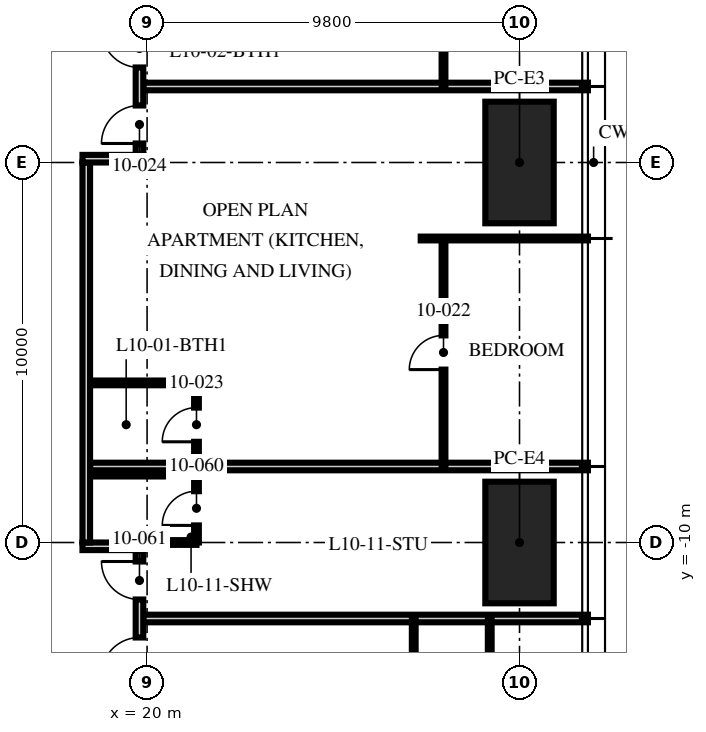
"""IFC4 building model, lengths in metres.
Left out: names, types, materials, properties, quantities, classifications, styles, units other than length and angle.
Written with IfcOpenShell. Run it as: python <this file> out.ifc"""

import sys

from ifc_helpers import new_model, si_unit, direction, frame, frame_2d, origin, origin_2d, place, context, subcontext, project, spatial, rectangle, hollow_rectangle, extrude, element, fill, save


model = new_model("IFC4")
c1 = context("Model", 3, precision=1e-05, world=origin(), true_north=direction((0.0, 1.0)))
c2 = subcontext(c1, "Body", "Model", "MODEL_VIEW")
j1 = project(units=[si_unit("LENGTHUNIT", "METRE"), si_unit("PLANEANGLEUNIT", "RADIAN")], contexts=[c1])
p1 = place(None, origin())
s1 = spatial("IfcSite", under=j1, at=p1, CompositionType="ELEMENT")
p2 = place(p1, origin())
s2 = spatial("IfcBuilding", under=s1, at=p2, CompositionType="ELEMENT")
p3 = place(p2, frame((0.0, 0.0, 43.5)))
s3 = spatial("IfcBuildingStorey", under=s2, at=p3, CompositionType="ELEMENT", Elevation=43.5)
for number, where, z_axis, x_axis in (
    (1, (29.8, 0.0, 0.0), (0.0, 0.0, 1.0), (0.0, 1.0, 0.0)),
    (2, (29.8, -10.0, 0.0), (0.0, 0.0, 1.0), (0.0, 1.0, 0.0)),
):
    element("IfcColumn", number, at=place(p3, frame(where, z_axis=z_axis, x_axis=x_axis)), inside=s3, PredefinedType="COLUMN", context=c2, shape_type="SweptSolid", body=[
        extrude(hollow_rectangle(XDim=3.2, YDim=1.8, WallThickness=0.2, at=origin_2d()), origin(), (0.0, 0.0, 1.0), 3.75),
    ])
p4 = place(p3, frame((18.5, -8.0, 0.0), z_axis=(0.0, 0.0, 1.0), x_axis=(1.0, 0.0, 0.0)))
e3 = element("IfcWall", 3, at=p4, inside=s3, PredefinedType="PARTITIONING", context=c2, shape_type="SweptSolid", body=[
    extrude(rectangle(XDim=13.1, YDim=0.2, at=frame_2d((6.55, 0.0))), origin(), (0.0, 0.0, 1.0), 2.71),
])
p5 = place(p3, frame((27.2, -2.0, 0.0), z_axis=(0.0, 0.0, 1.0), x_axis=(1.0, 0.0, 0.0)))
e4 = element("IfcWall", 4, at=p5, inside=s3, PredefinedType="PARTITIONING", context=c2, shape_type="SweptSolid", body=[
    extrude(rectangle(XDim=4.4, YDim=0.1, at=frame_2d((2.2, 0.0))), origin(), (0.0, 0.0, 1.0), 2.71),
])
for number, where, z_axis, x_axis in (
    (5, (19.9, 2.0, 0.0), (0.0, 0.0, 1.0), (1.0, 0.0, 0.0)),
    (6, (19.9, -12.0, 0.0), (0.0, 0.0, 1.0), (1.0, 0.0, 0.0)),
):
    element("IfcWall", number, at=place(p3, frame(where, z_axis=z_axis, x_axis=x_axis)), inside=s3, PredefinedType="PARTITIONING", context=c2, shape_type="SweptSolid", body=[
        extrude(rectangle(XDim=11.7, YDim=0.2, at=frame_2d((5.85, 0.0))), origin(), (0.0, 0.0, 1.0), 2.71),
    ])
p6 = place(p3, frame((27.8, -8.0, 0.0), z_axis=(0.0, 0.0, 1.0), x_axis=(0.0, 1.0, 0.0)))
e7 = element("IfcWall", 7, at=p6, inside=s3, PredefinedType="PARTITIONING", context=c2, shape_type="SweptSolid", body=[
    extrude(rectangle(XDim=6.0, YDim=0.1, at=frame_2d((3.0, 0.0))), origin(), (0.0, 0.0, 1.0), 2.61),
])
p7 = place(p6, frame((2.55, 0.0, 0.0)))
e8 = element("IfcOpeningElement", 8, at=p7, cuts=e7, PredefinedType="OPENING", context=c2, shape_type="SweptSolid", body=[
    extrude(rectangle(XDim=0.9, YDim=2.1, at=frame_2d((0.45, 1.05))), frame((0.0, 0.06, 0.0), z_axis=(0.0, -1.0, 0.0), x_axis=(1.0, 0.0, 0.0)), (0.0, 0.0, 1.0), 0.12),
])
p8 = place(p3, frame((21.3, -8.0, 0.0), z_axis=(0.0, 0.0, 1.0), x_axis=(0.0, 1.0, 0.0)))
e9 = element("IfcWall", 9, at=p8, inside=s3, PredefinedType="PARTITIONING", context=c2, shape_type="SweptSolid", body=[
    extrude(rectangle(XDim=2.2, YDim=0.125, at=frame_2d((1.1, 0.0))), origin(), (0.0, 0.0, 1.0), 3.5),
])
p9 = place(p8, frame((0.65, 0.0, 0.0)))
e10 = element("IfcOpeningElement", 10, at=p9, cuts=e9, PredefinedType="OPENING", context=c2, shape_type="SweptSolid", body=[
    extrude(rectangle(XDim=0.9, YDim=2.1, at=frame_2d((0.45, 1.05))), frame((0.0, 0.073, 0.0), z_axis=(0.0, -1.0, 0.0), x_axis=(1.0, 0.0, 0.0)), (0.0, 0.0, 1.0), 0.145),
])
p10 = place(p3, frame((18.5, -5.8, 0.0), z_axis=(0.0, 0.0, 1.0), x_axis=(1.0, 0.0, 0.0)))
e11 = element("IfcWall", 11, at=p10, inside=s3, PredefinedType="PARTITIONING", context=c2, shape_type="SweptSolid", body=[
    extrude(rectangle(XDim=2.8, YDim=0.125, at=frame_2d((1.4, 0.0))), origin(), (0.0, 0.0, 1.0), 3.5),
])
p11 = place(p3, frame((27.8, 2.0, 0.0), z_axis=(0.0, 0.0, 1.0), x_axis=(0.0, 1.0, 0.0)))
e12 = element("IfcWall", 12, at=p11, inside=s3, PredefinedType="PARTITIONING", context=c2, shape_type="SweptSolid", body=[
    extrude(rectangle(XDim=6.0, YDim=0.1, at=frame_2d((3.0, 0.0))), origin(), (0.0, 0.0, 1.0), 2.61),
])
p12 = place(p11, frame((2.55, 0.0, 0.0)))
e13 = element("IfcOpeningElement", 13, at=p12, cuts=e12, PredefinedType="OPENING", context=c2, shape_type="SweptSolid", body=[
    extrude(rectangle(XDim=0.9, YDim=2.1, at=frame_2d((0.45, 1.05))), frame((0.0, 0.06, 0.0), z_axis=(0.0, -1.0, 0.0), x_axis=(1.0, 0.0, 0.0)), (0.0, 0.0, 1.0), 0.12),
])
p13 = place(p3, frame((29.017, -18.0, 0.0), z_axis=(0.0, 0.0, 1.0), x_axis=(0.0, 1.0, 0.0)))
e14 = element("IfcWall", 14, at=p13, inside=s3, PredefinedType="PARTITIONING", context=c2, shape_type="SweptSolid", body=[
    extrude(rectangle(XDim=6.0, YDim=0.1, at=frame_2d((3.0, 0.0))), origin(), (0.0, 0.0, 1.0), 2.61),
])
p14 = place(p13, frame((0.15, 0.0, 0.0)))
e15 = element("IfcOpeningElement", 15, at=p14, cuts=e14, PredefinedType="OPENING", context=c2, shape_type="SweptSolid", body=[
    extrude(rectangle(XDim=0.9, YDim=2.1, at=frame_2d((0.45, 1.05))), frame((0.0, 0.06, 0.0), z_axis=(0.0, -1.0, 0.0), x_axis=(1.0, 0.0, 0.0)), (0.0, 0.0, 1.0), 0.12),
])
p15 = place(p13, frame((3.15, 0.0, 0.0)))
e16 = element("IfcOpeningElement", 16, at=p15, cuts=e14, PredefinedType="OPENING", context=c2, shape_type="SweptSolid", body=[
    extrude(rectangle(XDim=0.9, YDim=2.1, at=frame_2d((0.45, 1.05))), frame((0.0, 0.06, 0.0), z_axis=(0.0, -1.0, 0.0), x_axis=(1.0, 0.0, 0.0)), (0.0, 0.0, 1.0), 0.12),
])
p16 = place(p3, frame((27.017, -16.8, 0.0), z_axis=(0.0, 0.0, 1.0), x_axis=(0.0, 1.0, 0.0)))
e17 = element("IfcWall", 17, at=p16, inside=s3, PredefinedType="PARTITIONING", context=c2, shape_type="SweptSolid", body=[
    extrude(rectangle(XDim=4.8, YDim=0.1, at=frame_2d((2.4, 0.0))), origin(), (0.0, 0.0, 1.0), 2.61),
])
p17 = place(p3, frame((21.3, -10.0, 0.0), z_axis=(0.0, 0.0, 1.0), x_axis=(0.0, 1.0, 0.0)))
e18 = element("IfcWall", 18, at=p17, inside=s3, PredefinedType="PARTITIONING", context=c2, shape_type="SweptSolid", body=[
    extrude(rectangle(XDim=1.8, YDim=0.125, at=frame_2d((0.9, 0.0))), origin(), (0.0, 0.0, 1.0), 2.492),
])
p18 = place(p17, frame((0.45, 0.0, 0.0)))
e19 = element("IfcOpeningElement", 19, at=p18, cuts=e18, PredefinedType="OPENING", context=c2, shape_type="SweptSolid", body=[
    extrude(rectangle(XDim=0.9, YDim=2.1, at=frame_2d((0.45, 1.05))), frame((0.0, 0.073, 0.0), z_axis=(0.0, -1.0, 0.0), x_axis=(1.0, 0.0, 0.0)), (0.0, 0.0, 1.0), 0.145),
])
p19 = place(p3, frame((19.97, -10.0, 0.0), z_axis=(0.0, 0.0, 1.0), x_axis=(1.0, 0.0, 0.0)))
e20 = element("IfcWall", 20, at=p19, inside=s3, PredefinedType="PARTITIONING", context=c2, shape_type="SweptSolid", body=[
    extrude(rectangle(XDim=1.33, YDim=0.125, at=frame_2d((0.665, 0.0))), origin(), (0.0, 0.0, 1.0), 2.492),
])
p20 = place(p3, frame((18.5, -8.2, 0.0), z_axis=(0.0, 0.0, 1.0), x_axis=(1.0, 0.0, 0.0)))
e21 = element("IfcWall", 21, at=p20, inside=s3, PredefinedType="PARTITIONING", context=c2, shape_type="SweptSolid", body=[
    extrude(rectangle(XDim=2.8, YDim=0.125, at=frame_2d((1.4, 0.0))), origin(), (0.0, 0.0, 1.0), 3.5),
])
p21 = place(p3, frame((18.3, -10.1, 0.0), z_axis=(0.0, 0.0, 1.0), x_axis=(1.0, 0.0, 0.0)))
e22 = element("IfcWall", 22, at=p21, inside=s3, PredefinedType="PARTITIONING", context=c2, shape_type="SweptSolid", body=[
    extrude(rectangle(XDim=1.6, YDim=0.2, at=frame_2d((0.8, 0.0))), origin(), (0.0, 0.0, 1.0), 2.492),
])
p22 = place(p3, frame((19.8, -13.8, 0.0), z_axis=(0.0, 0.0, 1.0), x_axis=(0.0, 1.0, 0.0)))
e23 = element("IfcWall", 23, at=p22, inside=s3, PredefinedType="PARTITIONING", context=c2, shape_type="SweptSolid", body=[
    extrude(rectangle(XDim=3.6, YDim=0.2, at=frame_2d((1.8, 0.0))), origin(), (0.0, 0.0, 1.0), 3.5),
])
p23 = place(p22, frame((0.3, 0.0, 0.0)))
e24 = element("IfcOpeningElement", 24, at=p23, cuts=e23, PredefinedType="OPENING", context=c2, shape_type="SweptSolid", body=[
    extrude(rectangle(XDim=1.0, YDim=2.2, at=frame_2d((0.5, 1.1))), frame((0.0, 0.11, 0.0), z_axis=(0.0, -1.0, 0.0), x_axis=(1.0, 0.0, 0.0)), (0.0, 0.0, 1.0), 0.22),
])
p24 = place(p22, frame((2.3, 0.0, 0.0)))
e25 = element("IfcOpeningElement", 25, at=p24, cuts=e23, PredefinedType="OPENING", context=c2, shape_type="SweptSolid", body=[
    extrude(rectangle(XDim=1.0, YDim=2.2, at=frame_2d((0.5, 1.1))), frame((0.0, 0.11, 0.0), z_axis=(0.0, -1.0, 0.0), x_axis=(1.0, 0.0, 0.0)), (0.0, 0.0, 1.0), 0.22),
])
p25 = place(p3, frame((18.4, -10.0, 0.0), z_axis=(0.0, 0.0, 1.0), x_axis=(0.0, 1.0, 0.0)))
e26 = element("IfcWall", 26, at=p25, inside=s3, PredefinedType="PARTITIONING", context=c2, shape_type="SweptSolid", body=[
    extrude(rectangle(XDim=10.0, YDim=0.2, at=frame_2d((5.0, 0.0))), origin(), (0.0, 0.0, 1.0), 2.492),
])
p26 = place(p3, frame((18.3, 0.1, 0.0), z_axis=(0.0, 0.0, 1.0), x_axis=(1.0, 0.0, 0.0)))
e27 = element("IfcWall", 27, at=p26, inside=s3, PredefinedType="PARTITIONING", context=c2, shape_type="SweptSolid", body=[
    extrude(rectangle(XDim=1.6, YDim=0.2, at=frame_2d((0.8, 0.0))), origin(), (0.0, 0.0, 1.0), 2.492),
])
p27 = place(p3, frame((19.8, 0.2, 0.0), z_axis=(0.0, 0.0, 1.0), x_axis=(0.0, 1.0, 0.0)))
e28 = element("IfcWall", 28, at=p27, inside=s3, PredefinedType="PARTITIONING", context=c2, shape_type="SweptSolid", body=[
    extrude(rectangle(XDim=3.6, YDim=0.2, at=frame_2d((1.8, 0.0))), origin(), (0.0, 0.0, 1.0), 3.5),
])
p28 = place(p27, frame((0.3, 0.0, 0.0)))
e29 = element("IfcOpeningElement", 29, at=p28, cuts=e28, PredefinedType="OPENING", context=c2, shape_type="SweptSolid", body=[
    extrude(rectangle(XDim=1.0, YDim=2.2, at=frame_2d((0.5, 1.1))), frame((0.0, 0.11, 0.0), z_axis=(0.0, -1.0, 0.0), x_axis=(1.0, 0.0, 0.0)), (0.0, 0.0, 1.0), 0.22),
])
p29 = place(p27, frame((2.3, 0.0, 0.0)))
e30 = element("IfcOpeningElement", 30, at=p29, cuts=e28, PredefinedType="OPENING", context=c2, shape_type="SweptSolid", body=[
    extrude(rectangle(XDim=1.0, YDim=2.2, at=frame_2d((0.5, 1.1))), frame((0.0, 0.11, 0.0), z_axis=(0.0, -1.0, 0.0), x_axis=(1.0, 0.0, 0.0)), (0.0, 0.0, 1.0), 0.22),
])
p30 = place(p7, origin())
e31 = element("IfcDoor", 31, at=p30, inside=s3, OperationType="SINGLE_SWING_LEFT", PredefinedType="DOOR", context=c2, shape_type="SweptSolid", body=[
    extrude(rectangle(XDim=0.9, YDim=2.1, at=frame_2d((0.45, 1.05))), frame((0.0, 0.025, 0.0), z_axis=(0.0, -1.0, 0.0), x_axis=(1.0, 0.0, 0.0)), (0.0, 0.0, 1.0), 0.05),
])
fill(e8, e31)
p31 = place(p9, origin())
e32 = element("IfcDoor", 32, at=p31, inside=s3, OperationType="SINGLE_SWING_LEFT", PredefinedType="DOOR", context=c2, shape_type="SweptSolid", body=[
    extrude(rectangle(XDim=0.9, YDim=2.1, at=frame_2d((0.45, 1.05))), frame((0.0, 0.025, 0.0), z_axis=(0.0, -1.0, 0.0), x_axis=(1.0, 0.0, 0.0)), (0.0, 0.0, 1.0), 0.05),
])
fill(e10, e32)
p32 = place(p28, origin())
e33 = element("IfcDoor", 33, at=p32, inside=s3, OperationType="SINGLE_SWING_LEFT", PredefinedType="DOOR", context=c2, shape_type="SweptSolid", body=[
    extrude(rectangle(XDim=1.0, YDim=2.2, at=frame_2d((0.5, 1.1))), frame((0.0, 0.025, 0.0), z_axis=(0.0, -1.0, 0.0), x_axis=(1.0, 0.0, 0.0)), (0.0, 0.0, 1.0), 0.05),
])
fill(e29, e33)
p33 = place(p29, origin())
e34 = element("IfcDoor", 34, at=p33, inside=s3, OperationType="SINGLE_SWING_RIGHT", PredefinedType="DOOR", context=c2, shape_type="SweptSolid", body=[
    extrude(rectangle(XDim=1.0, YDim=2.2, at=frame_2d((0.5, 1.1))), frame((0.0, 0.025, 0.0), z_axis=(0.0, -1.0, 0.0), x_axis=(1.0, 0.0, 0.0)), (0.0, 0.0, 1.0), 0.05),
])
fill(e30, e34)
p34 = place(p23, origin())
e35 = element("IfcDoor", 35, at=p34, inside=s3, OperationType="SINGLE_SWING_LEFT", PredefinedType="DOOR", context=c2, shape_type="SweptSolid", body=[
    extrude(rectangle(XDim=1.0, YDim=2.2, at=frame_2d((0.5, 1.1))), frame((0.0, 0.025, 0.0), z_axis=(0.0, -1.0, 0.0), x_axis=(1.0, 0.0, 0.0)), (0.0, 0.0, 1.0), 0.05),
])
fill(e24, e35)
p35 = place(p18, origin())
e36 = element("IfcDoor", 36, at=p35, inside=s3, OperationType="SINGLE_SWING_LEFT", PredefinedType="DOOR", context=c2, shape_type="SweptSolid", body=[
    extrude(rectangle(XDim=0.9, YDim=2.1, at=frame_2d((0.45, 1.05))), frame((0.0, 0.025, 0.0), z_axis=(0.0, -1.0, 0.0), x_axis=(1.0, 0.0, 0.0)), (0.0, 0.0, 1.0), 0.05),
])
fill(e19, e36)
p36 = place(p24, origin())
e37 = element("IfcDoor", 37, at=p36, inside=s3, OperationType="SINGLE_SWING_RIGHT", PredefinedType="DOOR", context=c2, shape_type="SweptSolid", body=[
    extrude(rectangle(XDim=1.0, YDim=2.2, at=frame_2d((0.5, 1.1))), frame((0.0, 0.025, 0.0), z_axis=(0.0, -1.0, 0.0), x_axis=(1.0, 0.0, 0.0)), (0.0, 0.0, 1.0), 0.05),
])
fill(e25, e37)
save(model, sys.argv[1])
